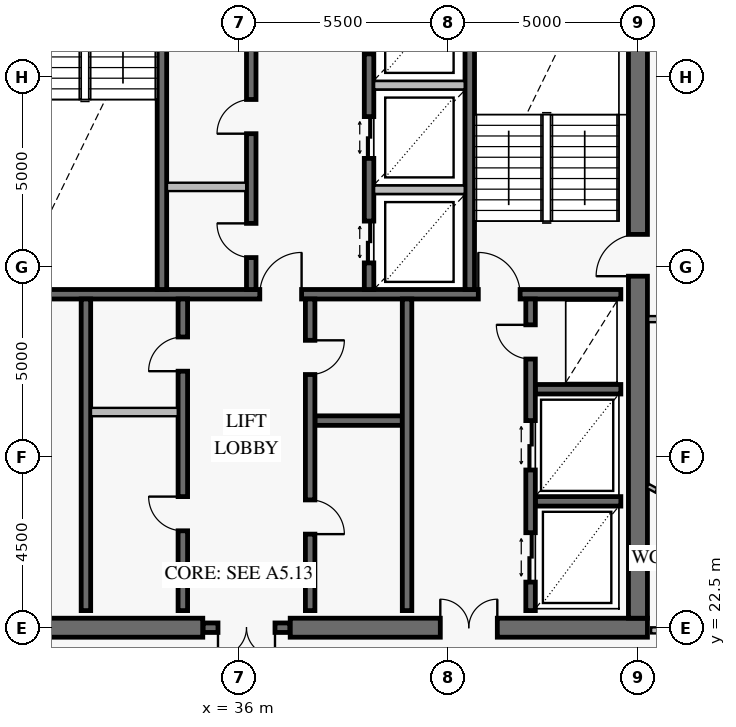
"""IFC4 building model, lengths in metres.
Left out: names, types, materials, properties, quantities, classifications, styles, units other than length and angle.
Written with IfcOpenShell. Run it as: python <this file> out.ifc"""

import sys

from ifc_helpers import new_model, si_unit, direction, frame, frame_2d, origin, place, context, subcontext, project, spatial, rectangle, extrude, element, fill, save


model = new_model("IFC4")
c1 = context("Model", 3, precision=1e-05, world=origin(), true_north=direction((0.0, 1.0)))
c2 = subcontext(c1, "Body", "Model", "MODEL_VIEW")
j1 = project(units=[si_unit("LENGTHUNIT", "METRE"), si_unit("PLANEANGLEUNIT", "RADIAN")], contexts=[c1])
p1 = place(None, origin())
s1 = spatial("IfcSite", under=j1, at=p1, CompositionType="ELEMENT")
p2 = place(p1, origin())
s2 = spatial("IfcBuilding", under=s1, at=p2, CompositionType="ELEMENT")
p3 = place(p2, frame((0.0, 0.0, 308.2)))
s3 = spatial("IfcBuildingStorey", under=s2, at=p3, CompositionType="ELEMENT", Elevation=308.2)
p4 = place(p3, frame((25.25, 22.5, 0.0), z_axis=(0.0, 0.0, 1.0), x_axis=(1.0, 0.0, 0.0)))
e1 = element("IfcWall", 1, at=p4, inside=s3, PredefinedType="SHEAR", context=c2, shape_type="SweptSolid", body=[
    extrude(rectangle(XDim=9.8, YDim=0.5, at=frame_2d((4.9, 0.0))), origin(), (0.0, 0.0, 1.0), 3.8),
])
p5 = place(p4, frame((4.15, 0.0, 0.0)))
e2 = element("IfcOpeningElement", 2, at=p5, cuts=e1, PredefinedType="OPENING", context=c2, shape_type="SweptSolid", body=[
    extrude(rectangle(XDim=1.5, YDim=2.15, at=frame_2d((0.75, 1.075))), frame((0.0, 0.262, 0.0), z_axis=(0.0, -1.0, 0.0), x_axis=(1.0, 0.0, 0.0)), (0.0, 0.0, 1.0), 0.524),
])
p6 = place(p3, frame((37.35, 22.5, 0.0), z_axis=(0.0, 0.0, 1.0), x_axis=(1.0, 0.0, 0.0)))
e3 = element("IfcWall", 3, at=p6, inside=s3, PredefinedType="SHEAR", context=c2, shape_type="SweptSolid", body=[
    extrude(rectangle(XDim=9.4, YDim=0.5, at=frame_2d((4.7, 0.0))), origin(), (0.0, 0.0, 1.0), 3.8),
])
p7 = place(p6, frame((3.95, 0.0, 0.0)))
e4 = element("IfcOpeningElement", 4, at=p7, cuts=e3, PredefinedType="OPENING", context=c2, shape_type="SweptSolid", body=[
    extrude(rectangle(XDim=1.5, YDim=2.15, at=frame_2d((0.75, 1.075))), frame((0.0, 0.262, 0.0), z_axis=(0.0, -1.0, 0.0), x_axis=(1.0, 0.0, 0.0)), (0.0, 0.0, 1.0), 0.524),
])
p8 = place(p3, frame((46.5, 22.75, 0.0), z_axis=(0.0, 0.0, 1.0), x_axis=(0.0, 1.0, 0.0)))
e5 = element("IfcWall", 5, at=p8, inside=s3, PredefinedType="SHEAR", context=c2, shape_type="SweptSolid", body=[
    extrude(rectangle(XDim=18.5, YDim=0.5, at=frame_2d((9.25, 0.0))), origin(), (0.0, 0.0, 1.0), 3.8),
])
p9 = place(p8, frame((9.0, 0.0, 0.0)))
e6 = element("IfcOpeningElement", 6, at=p9, cuts=e5, PredefinedType="OPENING", context=c2, shape_type="SweptSolid", body=[
    extrude(rectangle(XDim=1.1, YDim=2.15, at=frame_2d((0.55, 1.075))), frame((0.0, 0.262, 0.0), z_axis=(0.0, -1.0, 0.0), x_axis=(1.0, 0.0, 0.0)), (0.0, 0.0, 1.0), 0.524),
])
p10 = place(p3, frame((35.06, 22.5, 0.0), z_axis=(0.0, 0.0, 1.0), x_axis=(1.0, 0.0, 0.0)))
e7 = element("IfcWall", 7, at=p10, inside=s3, PredefinedType="SOLIDWALL", context=c2, shape_type="SweptSolid", body=[
    extrude(rectangle(XDim=2.28, YDim=0.25, at=frame_2d((1.14, 0.0))), origin(), (0.0, 0.0, 1.0), 3.8),
])
p11 = place(p10, frame((0.39, 0.0, 0.0)))
e8 = element("IfcOpeningElement", 8, at=p11, cuts=e7, PredefinedType="OPENING", context=c2, shape_type="SweptSolid", body=[
    extrude(rectangle(XDim=1.5, YDim=2.15, at=frame_2d((0.75, 1.075))), frame((0.0, 0.137, 0.0), z_axis=(0.0, -1.0, 0.0), x_axis=(1.0, 0.0, 0.0)), (0.0, 0.0, 1.0), 0.274),
])
p12 = place(p3, frame((25.95, 31.275, 0.0), z_axis=(0.0, 0.0, 1.0), x_axis=(1.0, 0.0, 0.0)))
e9 = element("IfcWall", 9, at=p12, inside=s3, PredefinedType="SOLIDWALL", context=c2, shape_type="SweptSolid", body=[
    extrude(rectangle(XDim=20.1, YDim=0.25, at=frame_2d((10.05, 0.0))), origin(), (0.0, 0.0, 1.0), 3.8),
])
p13 = place(p12, frame((2.6, 0.0, 0.0)))
e10 = element("IfcOpeningElement", 10, at=p13, cuts=e9, PredefinedType="OPENING", context=c2, shape_type="SweptSolid", body=[
    extrude(rectangle(XDim=1.1, YDim=2.15, at=frame_2d((0.55, 1.075))), frame((0.0, 0.137, 0.0), z_axis=(0.0, -1.0, 0.0), x_axis=(1.0, 0.0, 0.0)), (0.0, 0.0, 1.0), 0.274),
])
p14 = place(p12, frame((10.6, 0.0, 0.0)))
e11 = element("IfcOpeningElement", 11, at=p14, cuts=e9, PredefinedType="OPENING", context=c2, shape_type="SweptSolid", body=[
    extrude(rectangle(XDim=1.1, YDim=2.15, at=frame_2d((0.55, 1.075))), frame((0.0, 0.137, 0.0), z_axis=(0.0, -1.0, 0.0), x_axis=(1.0, 0.0, 0.0)), (0.0, 0.0, 1.0), 0.274),
])
p15 = place(p12, frame((16.35, 0.0, 0.0)))
e12 = element("IfcOpeningElement", 12, at=p15, cuts=e9, PredefinedType="OPENING", context=c2, shape_type="SweptSolid", body=[
    extrude(rectangle(XDim=1.1, YDim=2.15, at=frame_2d((0.55, 1.075))), frame((0.0, 0.137, 0.0), z_axis=(0.0, -1.0, 0.0), x_axis=(1.0, 0.0, 0.0)), (0.0, 0.0, 1.0), 0.274),
])
for number, where, z_axis, x_axis in (
    (13, (33.975, 31.4, 0.0), (0.0, 0.0, 1.0), (0.0, 1.0, 0.0)),
    (14, (42.075, 31.4, 0.0), (0.0, 0.0, 1.0), (0.0, 1.0, 0.0)),
):
    element("IfcWall", number, at=place(p3, frame(where, z_axis=z_axis, x_axis=x_axis)), inside=s3, PredefinedType="SOLIDWALL", context=c2, shape_type="SweptSolid", body=[
        extrude(rectangle(XDim=9.7, YDim=0.25, at=frame_2d((4.85, 0.0))), origin(), (0.0, 0.0, 1.0), 3.8),
    ])
p16 = place(p3, frame((36.325, 31.4, 0.0), z_axis=(0.0, 0.0, 1.0), x_axis=(0.0, 1.0, 0.0)))
e15 = element("IfcWall", 15, at=p16, inside=s3, PredefinedType="SOLIDWALL", context=c2, shape_type="SweptSolid", body=[
    extrude(rectangle(XDim=9.65, YDim=0.25, at=frame_2d((4.825, 0.0))), origin(), (0.0, 0.0, 1.0), 3.8),
])
p17 = place(p16, frame((0.84, 0.0, 0.0)))
e16 = element("IfcOpeningElement", 16, at=p17, cuts=e15, PredefinedType="OPENING", context=c2, shape_type="SweptSolid", body=[
    extrude(rectangle(XDim=0.9, YDim=2.1, at=frame_2d((0.45, 1.05))), frame((0.0, 0.137, 0.0), z_axis=(0.0, -1.0, 0.0), x_axis=(1.0, 0.0, 0.0)), (0.0, 0.0, 1.0), 0.274),
])
p18 = place(p16, frame((4.1, 0.0, 0.0)))
e17 = element("IfcOpeningElement", 17, at=p18, cuts=e15, PredefinedType="OPENING", context=c2, shape_type="SweptSolid", body=[
    extrude(rectangle(XDim=0.9, YDim=2.1, at=frame_2d((0.45, 1.05))), frame((0.0, 0.137, 0.0), z_axis=(0.0, -1.0, 0.0), x_axis=(1.0, 0.0, 0.0)), (0.0, 0.0, 1.0), 0.274),
])
p19 = place(p16, frame((7.61, 0.0, 0.0)))
e18 = element("IfcOpeningElement", 18, at=p19, cuts=e15, PredefinedType="OPENING", context=c2, shape_type="SweptSolid", body=[
    extrude(rectangle(XDim=0.9, YDim=2.1, at=frame_2d((0.45, 1.05))), frame((0.0, 0.137, 0.0), z_axis=(0.0, -1.0, 0.0), x_axis=(1.0, 0.0, 0.0)), (0.0, 0.0, 1.0), 0.274),
])
p20 = place(p3, frame((39.425, 31.4, 0.0), z_axis=(0.0, 0.0, 1.0), x_axis=(0.0, 1.0, 0.0)))
e19 = element("IfcWall", 19, at=p20, inside=s3, PredefinedType="SOLIDWALL", context=c2, shape_type="SweptSolid", body=[
    extrude(rectangle(XDim=9.65, YDim=0.25, at=frame_2d((4.825, 0.0))), origin(), (0.0, 0.0, 1.0), 3.8),
])
p21 = place(p20, frame((0.7, 0.0, 0.0)))
e20 = element("IfcOpeningElement", 20, at=p21, cuts=e19, PredefinedType="OPENING", context=c2, shape_type="SweptSolid", body=[
    extrude(rectangle(XDim=1.1, YDim=2.2, at=frame_2d((0.55, 1.1))), frame((0.0, 0.137, 0.0), z_axis=(0.0, -1.0, 0.0), x_axis=(1.0, 0.0, 0.0)), (0.0, 0.0, 1.0), 0.274),
])
p22 = place(p20, frame((3.45, 0.0, 0.0)))
e21 = element("IfcOpeningElement", 21, at=p22, cuts=e19, PredefinedType="OPENING", context=c2, shape_type="SweptSolid", body=[
    extrude(rectangle(XDim=1.1, YDim=2.2, at=frame_2d((0.55, 1.1))), frame((0.0, 0.137, 0.0), z_axis=(0.0, -1.0, 0.0), x_axis=(1.0, 0.0, 0.0)), (0.0, 0.0, 1.0), 0.274),
])
p23 = place(p20, frame((6.2, 0.0, 0.0)))
e22 = element("IfcOpeningElement", 22, at=p23, cuts=e19, PredefinedType="OPENING", context=c2, shape_type="SweptSolid", body=[
    extrude(rectangle(XDim=1.1, YDim=2.2, at=frame_2d((0.55, 1.1))), frame((0.0, 0.137, 0.0), z_axis=(0.0, -1.0, 0.0), x_axis=(1.0, 0.0, 0.0)), (0.0, 0.0, 1.0), 0.274),
])
p24 = place(p20, frame((8.47, 0.0, 0.0)))
e23 = element("IfcOpeningElement", 23, at=p24, cuts=e19, PredefinedType="OPENING", context=c2, shape_type="SweptSolid", body=[
    extrude(rectangle(XDim=0.9, YDim=2.1, at=frame_2d((0.45, 1.05))), frame((0.0, 0.137, 0.0), z_axis=(0.0, -1.0, 0.0), x_axis=(1.0, 0.0, 0.0)), (0.0, 0.0, 1.0), 0.274),
])
p25 = place(p3, frame((31.975, 22.95, 0.0), z_axis=(0.0, 0.0, 1.0), x_axis=(0.0, 1.0, 0.0)))
e24 = element("IfcWall", 24, at=p25, inside=s3, PredefinedType="SOLIDWALL", context=c2, shape_type="SweptSolid", body=[
    extrude(rectangle(XDim=8.2, YDim=0.25, at=frame_2d((4.1, 0.0))), origin(), (0.0, 0.0, 1.0), 3.8),
])
p26 = place(p3, frame((34.525, 22.95, 0.0), z_axis=(0.0, 0.0, 1.0), x_axis=(0.0, 1.0, 0.0)))
e25 = element("IfcWall", 25, at=p26, inside=s3, PredefinedType="SOLIDWALL", context=c2, shape_type="SweptSolid", body=[
    extrude(rectangle(XDim=8.2, YDim=0.25, at=frame_2d((4.1, 0.0))), origin(), (0.0, 0.0, 1.0), 3.8),
])
p27 = place(p26, frame((2.1, 0.0, 0.0)))
e26 = element("IfcOpeningElement", 26, at=p27, cuts=e25, PredefinedType="OPENING", context=c2, shape_type="SweptSolid", body=[
    extrude(rectangle(XDim=0.9, YDim=2.1, at=frame_2d((0.45, 1.05))), frame((0.0, 0.137, 0.0), z_axis=(0.0, -1.0, 0.0), x_axis=(1.0, 0.0, 0.0)), (0.0, 0.0, 1.0), 0.274),
])
p28 = place(p26, frame((6.3, 0.0, 0.0)))
e27 = element("IfcOpeningElement", 27, at=p28, cuts=e25, PredefinedType="OPENING", context=c2, shape_type="SweptSolid", body=[
    extrude(rectangle(XDim=0.9, YDim=2.1, at=frame_2d((0.45, 1.05))), frame((0.0, 0.137, 0.0), z_axis=(0.0, -1.0, 0.0), x_axis=(1.0, 0.0, 0.0)), (0.0, 0.0, 1.0), 0.274),
])
p29 = place(p3, frame((38.0, 27.95, 0.0), z_axis=(0.0, 0.0, 1.0), x_axis=(1.0, 0.0, 0.0)))
e28 = element("IfcWall", 28, at=p29, inside=s3, PredefinedType="SOLIDWALL", context=c2, shape_type="SweptSolid", body=[
    extrude(rectangle(XDim=2.3, YDim=0.25, at=frame_2d((1.15, 0.0))), origin(), (0.0, 0.0, 1.0), 3.8),
])
p30 = place(p3, frame((37.875, 22.95, 0.0), z_axis=(0.0, 0.0, 1.0), x_axis=(0.0, 1.0, 0.0)))
e29 = element("IfcWall", 29, at=p30, inside=s3, PredefinedType="SOLIDWALL", context=c2, shape_type="SweptSolid", body=[
    extrude(rectangle(XDim=8.2, YDim=0.25, at=frame_2d((4.1, 0.0))), origin(), (0.0, 0.0, 1.0), 3.8),
])
p31 = place(p30, frame((2.012, 0.0, 0.0)))
e30 = element("IfcOpeningElement", 30, at=p31, cuts=e29, PredefinedType="OPENING", context=c2, shape_type="SweptSolid", body=[
    extrude(rectangle(XDim=0.9, YDim=2.1, at=frame_2d((0.45, 1.05))), frame((0.0, 0.137, 0.0), z_axis=(0.0, -1.0, 0.0), x_axis=(1.0, 0.0, 0.0)), (0.0, 0.0, 1.0), 0.274),
])
p32 = place(p30, frame((6.212, 0.0, 0.0)))
e31 = element("IfcOpeningElement", 31, at=p32, cuts=e29, PredefinedType="OPENING", context=c2, shape_type="SweptSolid", body=[
    extrude(rectangle(XDim=0.9, YDim=2.1, at=frame_2d((0.45, 1.05))), frame((0.0, 0.137, 0.0), z_axis=(0.0, -1.0, 0.0), x_axis=(1.0, 0.0, 0.0)), (0.0, 0.0, 1.0), 0.274),
])
p33 = place(p3, frame((40.425, 22.95, 0.0), z_axis=(0.0, 0.0, 1.0), x_axis=(0.0, 1.0, 0.0)))
e32 = element("IfcWall", 32, at=p33, inside=s3, PredefinedType="SOLIDWALL", context=c2, shape_type="SweptSolid", body=[
    extrude(rectangle(XDim=8.2, YDim=0.25, at=frame_2d((4.1, 0.0))), origin(), (0.0, 0.0, 1.0), 3.8),
])
for number, where, z_axis, x_axis in (
    (33, (43.8, 25.825, 0.0), (0.0, 0.0, 1.0), (1.0, 0.0, 0.0)),
    (34, (43.8, 28.775, 0.0), (0.0, 0.0, 1.0), (1.0, 0.0, 0.0)),
):
    element("IfcWall", number, at=place(p3, frame(where, z_axis=z_axis, x_axis=x_axis)), inside=s3, PredefinedType="SOLIDWALL", context=c2, shape_type="SweptSolid", body=[
        extrude(rectangle(XDim=2.25, YDim=0.25, at=frame_2d((1.125, 0.0))), origin(), (0.0, 0.0, 1.0), 3.8),
    ])
p34 = place(p3, frame((43.675, 22.95, 0.0), z_axis=(0.0, 0.0, 1.0), x_axis=(0.0, 1.0, 0.0)))
e35 = element("IfcWall", 35, at=p34, inside=s3, PredefinedType="SOLIDWALL", context=c2, shape_type="SweptSolid", body=[
    extrude(rectangle(XDim=8.2, YDim=0.25, at=frame_2d((4.1, 0.0))), origin(), (0.0, 0.0, 1.0), 3.8),
])
p35 = place(p34, frame((0.75, 0.0, 0.0)))
e36 = element("IfcOpeningElement", 36, at=p35, cuts=e35, PredefinedType="OPENING", context=c2, shape_type="SweptSolid", body=[
    extrude(rectangle(XDim=1.3, YDim=2.3, at=frame_2d((0.65, 1.15))), frame((0.0, 0.137, 0.0), z_axis=(0.0, -1.0, 0.0), x_axis=(1.0, 0.0, 0.0)), (0.0, 0.0, 1.0), 0.274),
])
p36 = place(p34, frame((3.7, 0.0, 0.0)))
e37 = element("IfcOpeningElement", 37, at=p36, cuts=e35, PredefinedType="OPENING", context=c2, shape_type="SweptSolid", body=[
    extrude(rectangle(XDim=1.3, YDim=2.3, at=frame_2d((0.65, 1.15))), frame((0.0, 0.137, 0.0), z_axis=(0.0, -1.0, 0.0), x_axis=(1.0, 0.0, 0.0)), (0.0, 0.0, 1.0), 0.274),
])
p37 = place(p34, frame((6.62, 0.0, 0.0)))
e38 = element("IfcOpeningElement", 38, at=p37, cuts=e35, PredefinedType="OPENING", context=c2, shape_type="SweptSolid", body=[
    extrude(rectangle(XDim=0.9, YDim=2.1, at=frame_2d((0.45, 1.05))), frame((0.0, 0.137, 0.0), z_axis=(0.0, -1.0, 0.0), x_axis=(1.0, 0.0, 0.0)), (0.0, 0.0, 1.0), 0.274),
])
p38 = place(p3, frame((46.758, 26.232, 0.0), z_axis=(0.0, 0.0, 1.0), x_axis=(0.881229995183, -0.472687735814, 0.0)))
e39 = element("IfcWall", 39, at=p38, inside=s3, PredefinedType="PARTITIONING", context=c2, shape_type="SweptSolid", body=[
    extrude(rectangle(XDim=1.743, YDim=0.12, at=frame_2d((0.872, 0.0))), origin(), (0.0, 0.0, 1.0), 3.55),
])
p39 = place(p38, frame((0.26, 0.0, 0.0)))
e40 = element("IfcOpeningElement", 40, at=p39, cuts=e39, PredefinedType="OPENING", context=c2, shape_type="SweptSolid", body=[
    extrude(rectangle(XDim=0.9, YDim=2.1, at=frame_2d((0.45, 1.05))), frame((0.0, 0.072, 0.0), z_axis=(0.0, -1.0, 0.0), x_axis=(1.0, 0.0, 0.0)), (0.0, 0.0, 1.0), 0.144),
])
p40 = place(p3, frame((48.8, 22.43, 0.0), z_axis=(0.0, 0.0, 1.0), x_axis=(-1.0, 0.0, 0.0)))
e41 = element("IfcWall", 41, at=p40, inside=s3, PredefinedType="PARTITIONING", context=c2, shape_type="SweptSolid", body=[
    extrude(rectangle(XDim=1.953, YDim=0.16, at=frame_2d((0.977, 0.0))), origin(), (0.0, 0.0, 1.0), 3.55),
])
p41 = place(p40, frame((0.451, 0.0, 0.0)))
e42 = element("IfcOpeningElement", 42, at=p41, cuts=e41, PredefinedType="OPENING", context=c2, shape_type="SweptSolid", body=[
    extrude(rectangle(XDim=1.05, YDim=2.15, at=frame_2d((0.525, 1.075))), frame((0.0, 0.092, 0.0), z_axis=(0.0, -1.0, 0.0), x_axis=(1.0, 0.0, 0.0)), (0.0, 0.0, 1.0), 0.184),
])
p42 = place(p3, frame((34.108, 34.1, 0.0), z_axis=(0.0, 0.0, 1.0), x_axis=(1.0, 0.0, 0.0)))
e43 = element("IfcWall", 43, at=p42, inside=s3, PredefinedType="PARTITIONING", context=c2, shape_type="SweptSolid", body=[
    extrude(rectangle(XDim=2.084, YDim=0.22, at=frame_2d((1.042, 0.0))), origin(), (0.0, 0.0, 1.0), 3.55),
])
for number, where, z_axis, x_axis in (
    (44, (39.558, 34.025, 0.0), (0.0, 0.0, 1.0), (1.0, 0.0, 0.0)),
    (45, (39.558, 36.775, 0.0), (0.0, 0.0, 1.0), (1.0, 0.0, 0.0)),
):
    element("IfcWall", number, at=place(p3, frame(where, z_axis=z_axis, x_axis=x_axis)), inside=s3, PredefinedType="PARTITIONING", context=c2, shape_type="SweptSolid", body=[
        extrude(rectangle(XDim=2.384, YDim=0.22, at=frame_2d((1.192, 0.0))), origin(), (0.0, 0.0, 1.0), 3.55),
    ])
p43 = place(p3, frame((32.108, 28.175, 0.0), z_axis=(0.0, 0.0, 1.0), x_axis=(1.0, 0.0, 0.0)))
e46 = element("IfcWall", 46, at=p43, inside=s3, PredefinedType="PARTITIONING", context=c2, shape_type="SweptSolid", body=[
    extrude(rectangle(XDim=2.284, YDim=0.22, at=frame_2d((1.142, 0.0))), origin(), (0.0, 0.0, 1.0), 3.55),
])
p44 = place(p3, frame((46.77, 30.62, 0.0), z_axis=(0.0, 0.0, 1.0), x_axis=(1.0, 0.0, 0.0)))
e47 = element("IfcWall", 47, at=p44, inside=s3, PredefinedType="PARTITIONING", context=c2, shape_type="SweptSolid", body=[
    extrude(rectangle(XDim=1.165, YDim=0.16, at=frame_2d((0.583, 0.0))), origin(), (0.0, 0.0, 1.0), 3.55),
])
p45 = place(p9, origin())
e48 = element("IfcDoor", 48, at=p45, inside=s3, OperationType="SINGLE_SWING_LEFT", PredefinedType="USERDEFINED", context=c2, shape_type="SweptSolid", body=[
    extrude(rectangle(XDim=1.1, YDim=2.15, at=frame_2d((0.55, 1.075))), frame((0.0, 0.025, 0.0), z_axis=(0.0, -1.0, 0.0), x_axis=(1.0, 0.0, 0.0)), (0.0, 0.0, 1.0), 0.05),
])
fill(e6, e48)
p46 = place(p7, origin())
e49 = element("IfcDoor", 49, at=p46, inside=s3, OperationType="DOUBLE_DOOR_SINGLE_SWING", PredefinedType="DOOR", context=c2, shape_type="SweptSolid", body=[
    extrude(rectangle(XDim=1.5, YDim=2.15, at=frame_2d((0.75, 1.075))), frame((0.0, 0.025, 0.0), z_axis=(0.0, -1.0, 0.0), x_axis=(1.0, 0.0, 0.0)), (0.0, 0.0, 1.0), 0.05),
])
fill(e4, e49)
p47 = place(p11, frame((1.5, 0.0, 0.0), z_axis=(0.0, 0.0, 1.0), x_axis=(-1.0, 0.0, 0.0)))
e50 = element("IfcDoor", 50, at=p47, inside=s3, OperationType="DOUBLE_DOOR_SINGLE_SWING", PredefinedType="DOOR", context=c2, shape_type="SweptSolid", body=[
    extrude(rectangle(XDim=1.5, YDim=2.15, at=frame_2d((0.75, 1.075))), frame((0.0, 0.025, 0.0), z_axis=(0.0, -1.0, 0.0), x_axis=(1.0, 0.0, 0.0)), (0.0, 0.0, 1.0), 0.05),
])
fill(e8, e50)
p48 = place(p14, origin())
e51 = element("IfcDoor", 51, at=p48, inside=s3, OperationType="SINGLE_SWING_RIGHT", PredefinedType="USERDEFINED", context=c2, shape_type="SweptSolid", body=[
    extrude(rectangle(XDim=1.1, YDim=2.15, at=frame_2d((0.55, 1.075))), frame((0.0, 0.025, 0.0), z_axis=(0.0, -1.0, 0.0), x_axis=(1.0, 0.0, 0.0)), (0.0, 0.0, 1.0), 0.05),
])
fill(e11, e51)
p49 = place(p15, origin())
e52 = element("IfcDoor", 52, at=p49, inside=s3, OperationType="SINGLE_SWING_LEFT", PredefinedType="USERDEFINED", context=c2, shape_type="SweptSolid", body=[
    extrude(rectangle(XDim=1.1, YDim=2.15, at=frame_2d((0.55, 1.075))), frame((0.0, 0.025, 0.0), z_axis=(0.0, -1.0, 0.0), x_axis=(1.0, 0.0, 0.0)), (0.0, 0.0, 1.0), 0.05),
])
fill(e12, e52)
p50 = place(p17, origin())
e53 = element("IfcDoor", 53, at=p50, inside=s3, OperationType="SINGLE_SWING_RIGHT", PredefinedType="DOOR", context=c2, shape_type="SweptSolid", body=[
    extrude(rectangle(XDim=0.9, YDim=2.1, at=frame_2d((0.45, 1.05))), frame((0.0, 0.025, 0.0), z_axis=(0.0, -1.0, 0.0), x_axis=(1.0, 0.0, 0.0)), (0.0, 0.0, 1.0), 0.05),
])
fill(e16, e53)
p51 = place(p18, origin())
e54 = element("IfcDoor", 54, at=p51, inside=s3, OperationType="SINGLE_SWING_LEFT", PredefinedType="DOOR", context=c2, shape_type="SweptSolid", body=[
    extrude(rectangle(XDim=0.9, YDim=2.1, at=frame_2d((0.45, 1.05))), frame((0.0, 0.025, 0.0), z_axis=(0.0, -1.0, 0.0), x_axis=(1.0, 0.0, 0.0)), (0.0, 0.0, 1.0), 0.05),
])
fill(e17, e54)
p52 = place(p21, origin())
e55 = element("IfcDoor", 55, at=p52, inside=s3, OperationType="DOUBLE_DOOR_SLIDING", PredefinedType="DOOR", context=c2, shape_type="SweptSolid", body=[
    extrude(rectangle(XDim=1.1, YDim=2.2, at=frame_2d((0.55, 1.1))), frame((0.0, 0.025, 0.0), z_axis=(0.0, -1.0, 0.0), x_axis=(1.0, 0.0, 0.0)), (0.0, 0.0, 1.0), 0.05),
])
fill(e20, e55)
p53 = place(p22, origin())
e56 = element("IfcDoor", 56, at=p53, inside=s3, OperationType="DOUBLE_DOOR_SLIDING", PredefinedType="DOOR", context=c2, shape_type="SweptSolid", body=[
    extrude(rectangle(XDim=1.1, YDim=2.2, at=frame_2d((0.55, 1.1))), frame((0.0, 0.025, 0.0), z_axis=(0.0, -1.0, 0.0), x_axis=(1.0, 0.0, 0.0)), (0.0, 0.0, 1.0), 0.05),
])
fill(e21, e56)
p54 = place(p23, origin())
e57 = element("IfcDoor", 57, at=p54, inside=s3, OperationType="DOUBLE_DOOR_SLIDING", PredefinedType="DOOR", context=c2, shape_type="SweptSolid", body=[
    extrude(rectangle(XDim=1.1, YDim=2.2, at=frame_2d((0.55, 1.1))), frame((0.0, 0.025, 0.0), z_axis=(0.0, -1.0, 0.0), x_axis=(1.0, 0.0, 0.0)), (0.0, 0.0, 1.0), 0.05),
])
fill(e22, e57)
p55 = place(p27, origin())
e58 = element("IfcDoor", 58, at=p55, inside=s3, OperationType="SINGLE_SWING_RIGHT", PredefinedType="DOOR", context=c2, shape_type="SweptSolid", body=[
    extrude(rectangle(XDim=0.9, YDim=2.1, at=frame_2d((0.45, 1.05))), frame((0.0, 0.025, 0.0), z_axis=(0.0, -1.0, 0.0), x_axis=(1.0, 0.0, 0.0)), (0.0, 0.0, 1.0), 0.05),
])
fill(e26, e58)
p56 = place(p28, origin())
e59 = element("IfcDoor", 59, at=p56, inside=s3, OperationType="SINGLE_SWING_LEFT", PredefinedType="DOOR", context=c2, shape_type="SweptSolid", body=[
    extrude(rectangle(XDim=0.9, YDim=2.1, at=frame_2d((0.45, 1.05))), frame((0.0, 0.025, 0.0), z_axis=(0.0, -1.0, 0.0), x_axis=(1.0, 0.0, 0.0)), (0.0, 0.0, 1.0), 0.05),
])
fill(e27, e59)
p57 = place(p31, frame((0.9, 0.0, 0.0), z_axis=(0.0, 0.0, 1.0), x_axis=(-1.0, 0.0, 0.0)))
e60 = element("IfcDoor", 60, at=p57, inside=s3, OperationType="SINGLE_SWING_RIGHT", PredefinedType="DOOR", context=c2, shape_type="SweptSolid", body=[
    extrude(rectangle(XDim=0.9, YDim=2.1, at=frame_2d((0.45, 1.05))), frame((0.0, 0.025, 0.0), z_axis=(0.0, -1.0, 0.0), x_axis=(1.0, 0.0, 0.0)), (0.0, 0.0, 1.0), 0.05),
])
fill(e30, e60)
p58 = place(p32, frame((0.9, 0.0, 0.0), z_axis=(0.0, 0.0, 1.0), x_axis=(-1.0, 0.0, 0.0)))
e61 = element("IfcDoor", 61, at=p58, inside=s3, OperationType="SINGLE_SWING_LEFT", PredefinedType="DOOR", context=c2, shape_type="SweptSolid", body=[
    extrude(rectangle(XDim=0.9, YDim=2.1, at=frame_2d((0.45, 1.05))), frame((0.0, 0.025, 0.0), z_axis=(0.0, -1.0, 0.0), x_axis=(1.0, 0.0, 0.0)), (0.0, 0.0, 1.0), 0.05),
])
fill(e31, e61)
p59 = place(p35, origin())
e62 = element("IfcDoor", 62, at=p59, inside=s3, OperationType="DOUBLE_DOOR_SLIDING", PredefinedType="DOOR", context=c2, shape_type="SweptSolid", body=[
    extrude(rectangle(XDim=1.3, YDim=2.3, at=frame_2d((0.65, 1.15))), frame((0.0, 0.025, 0.0), z_axis=(0.0, -1.0, 0.0), x_axis=(1.0, 0.0, 0.0)), (0.0, 0.0, 1.0), 0.05),
])
fill(e36, e62)
p60 = place(p36, origin())
e63 = element("IfcDoor", 63, at=p60, inside=s3, OperationType="DOUBLE_DOOR_SLIDING", PredefinedType="DOOR", context=c2, shape_type="SweptSolid", body=[
    extrude(rectangle(XDim=1.3, YDim=2.3, at=frame_2d((0.65, 1.15))), frame((0.0, 0.025, 0.0), z_axis=(0.0, -1.0, 0.0), x_axis=(1.0, 0.0, 0.0)), (0.0, 0.0, 1.0), 0.05),
])
fill(e37, e63)
p61 = place(p37, origin())
e64 = element("IfcDoor", 64, at=p61, inside=s3, OperationType="SINGLE_SWING_RIGHT", PredefinedType="DOOR", context=c2, shape_type="SweptSolid", body=[
    extrude(rectangle(XDim=0.9, YDim=2.1, at=frame_2d((0.45, 1.05))), frame((0.0, 0.025, 0.0), z_axis=(0.0, -1.0, 0.0), x_axis=(1.0, 0.0, 0.0)), (0.0, 0.0, 1.0), 0.05),
])
fill(e38, e64)
p62 = place(p39, origin())
e65 = element("IfcDoor", 65, at=p62, inside=s3, OperationType="SINGLE_SWING_LEFT", PredefinedType="DOOR", context=c2, shape_type="SweptSolid", body=[
    extrude(rectangle(XDim=0.9, YDim=2.1, at=frame_2d((0.45, 1.05))), frame((0.0, 0.025, 0.0), z_axis=(0.0, -1.0, 0.0), x_axis=(1.0, 0.0, 0.0)), (0.0, 0.0, 1.0), 0.05),
])
fill(e40, e65)
save(model, sys.argv[1])
